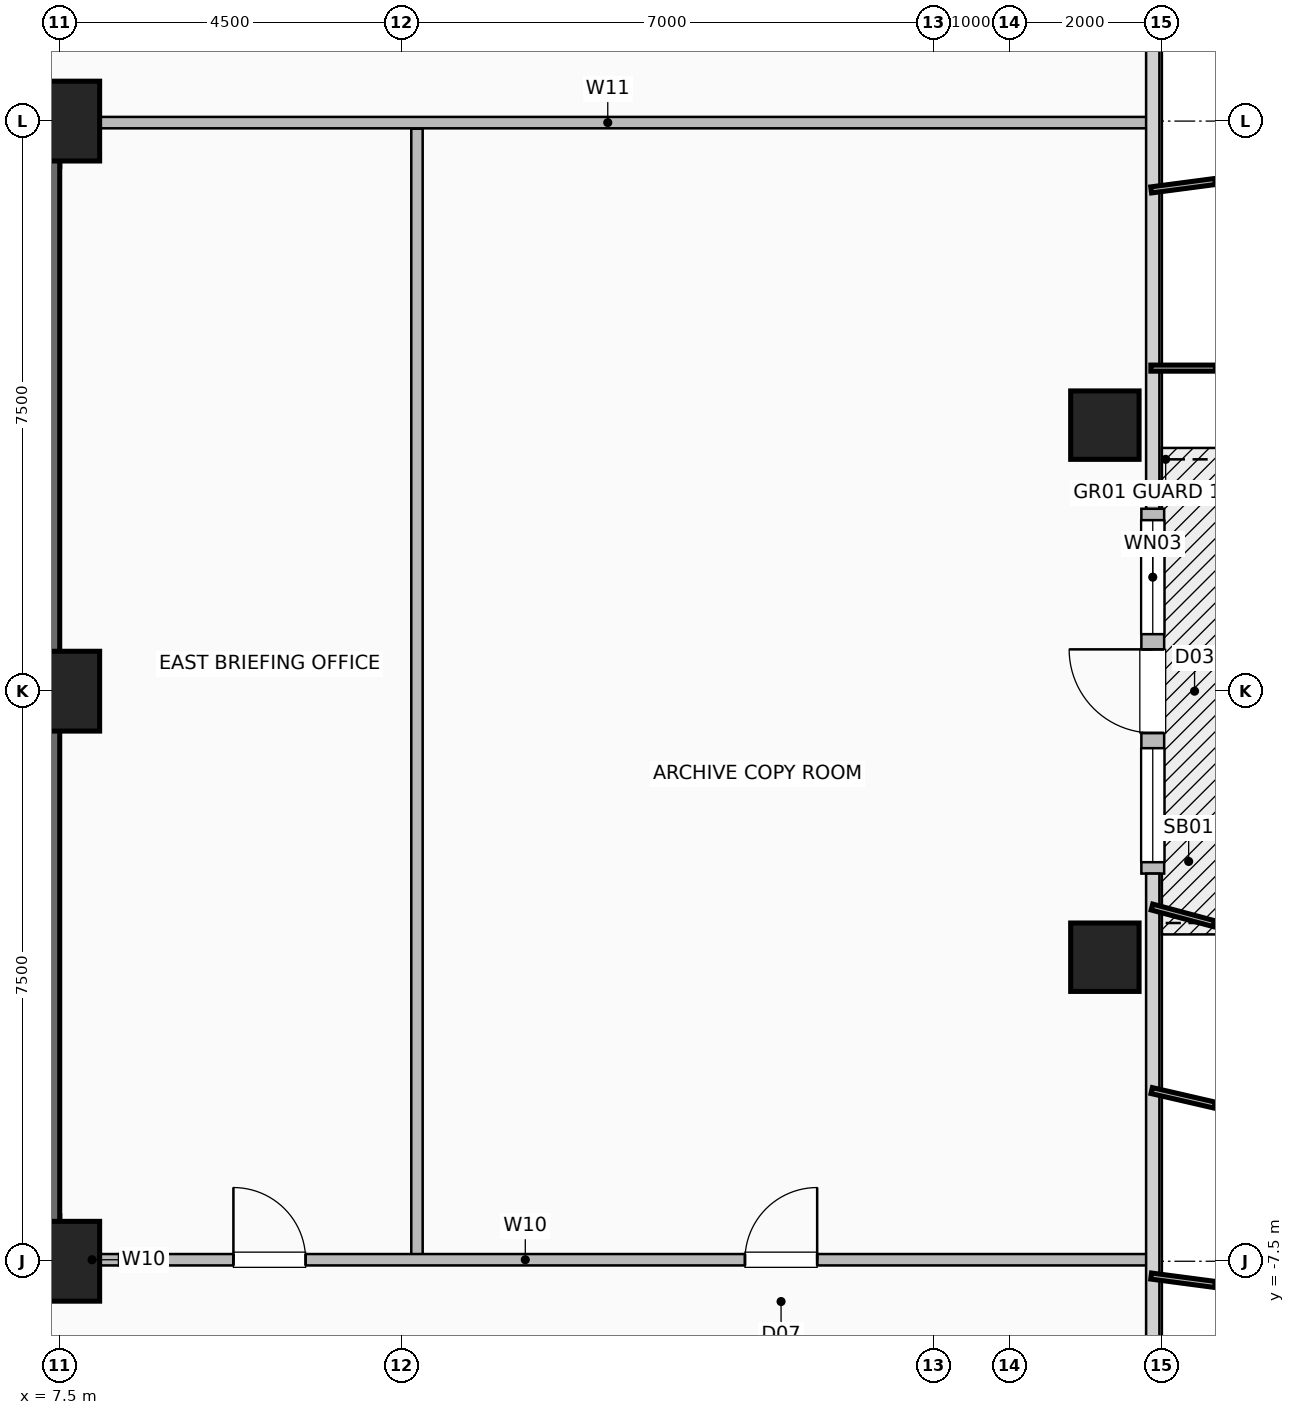
"""IFC4 building model, lengths in metres.
Left out: names, types, materials, properties, quantities, classifications, styles, units other than length and angle.
Written with IfcOpenShell. Run it as: python <this file> out.ifc"""

import sys

from ifc_helpers import new_model, si_unit, direction, frame, frame_2d, origin, origin_2d, place, context, subcontext, project, spatial, rectangle, hollow_rectangle, extrude, element, fill, save


model = new_model("IFC4")
c1 = context("Model", 3, precision=1e-05, world=origin(), true_north=direction((0.0, 1.0)))
c2 = subcontext(c1, "Body", "Model", "MODEL_VIEW")
j1 = project(units=[si_unit("LENGTHUNIT", "METRE"), si_unit("PLANEANGLEUNIT", "RADIAN")], contexts=[c1])
p1 = place(None, origin())
s1 = spatial("IfcSite", under=j1, at=p1, CompositionType="ELEMENT")
p2 = place(p1, origin())
s2 = spatial("IfcBuilding", under=s1, at=p2, CompositionType="ELEMENT")
p3 = place(p2, frame((0.0, 0.0, 104.8)))
s3 = spatial("IfcBuildingStorey", under=s2, at=p3, CompositionType="ELEMENT", Elevation=104.8)
for number, where, z_axis, x_axis in (
    (1, (7.5, -7.5, 0.0), (0.0, 0.0, 1.0), (1.0, 0.0, 0.0)),
    (2, (7.5, 0.0, 0.0), (0.0, 0.0, 1.0), (1.0, 0.0, 0.0)),
    (3, (7.5, 7.5, 0.0), (0.0, 0.0, 1.0), (1.0, 0.0, 0.0)),
):
    element("IfcColumn", number, at=place(p3, frame(where, z_axis=z_axis, x_axis=x_axis)), inside=s3, PredefinedType="COLUMN", context=c2, shape_type="SweptSolid", body=[
        extrude(hollow_rectangle(XDim=1.05, YDim=1.05, WallThickness=0.05, at=origin_2d()), origin(), (0.0, 0.0, 1.0), 3.6),
    ])
for number, where, z_axis, x_axis in (
    (4, (21.25, -3.5, 0.0), (0.0, 0.0, 1.0), (1.0, 0.0, 0.0)),
    (5, (21.25, 3.5, 0.0), (0.0, 0.0, 1.0), (1.0, 0.0, 0.0)),
):
    element("IfcColumn", number, at=place(p3, frame(where, z_axis=z_axis, x_axis=x_axis)), inside=s3, PredefinedType="COLUMN", context=c2, shape_type="SweptSolid", body=[
        extrude(hollow_rectangle(XDim=0.9, YDim=0.9, WallThickness=0.045, at=origin_2d()), origin(), (0.0, 0.0, 1.0), 3.6),
    ])
p4 = place(p3, frame((21.88, -2.4, 0.0), z_axis=(0.0, 0.0, 1.0), x_axis=(0.0, 1.0, 0.0)))
e6 = element("IfcWall", 6, at=p4, inside=s3, PredefinedType="SOLIDWALL", context=c2, shape_type="SweptSolid", body=[
    extrude(rectangle(XDim=4.8, YDim=0.3, at=frame_2d((2.4, 0.0))), origin(), (0.0, 0.0, 1.0), 3.36),
])
p5 = place(p4, frame((1.85, 0.0, 0.0)))
e7 = element("IfcOpeningElement", 7, at=p5, cuts=e6, PredefinedType="OPENING", context=c2, shape_type="SweptSolid", body=[
    extrude(rectangle(XDim=1.1, YDim=2.2, at=frame_2d((0.55, 1.1))), frame((0.0, 0.16, 0.0), z_axis=(0.0, -1.0, 0.0), x_axis=(1.0, 0.0, 0.0)), (0.0, 0.0, 1.0), 0.32),
])
p6 = place(p4, frame((0.15, 0.0, 0.85)))
e8 = element("IfcOpeningElement", 8, at=p6, cuts=e6, PredefinedType="OPENING", context=c2, shape_type="SweptSolid", body=[
    extrude(rectangle(XDim=1.5, YDim=1.8, at=frame_2d((0.75, 0.9))), frame((0.0, 0.16, 0.0), z_axis=(0.0, -1.0, 0.0), x_axis=(1.0, 0.0, 0.0)), (0.0, 0.0, 1.0), 0.32),
])
p7 = place(p4, frame((3.15, 0.0, 0.85)))
e9 = element("IfcOpeningElement", 9, at=p7, cuts=e6, PredefinedType="OPENING", context=c2, shape_type="SweptSolid", body=[
    extrude(rectangle(XDim=1.5, YDim=1.8, at=frame_2d((0.75, 0.9))), frame((0.0, 0.16, 0.0), z_axis=(0.0, -1.0, 0.0), x_axis=(1.0, 0.0, 0.0)), (0.0, 0.0, 1.0), 0.32),
])
p8 = place(p3, frame((-7.5, -7.2, 0.0), z_axis=(0.0, 0.0, 1.0), x_axis=(1.0, 0.0, 0.0)))
e10 = element("IfcWall", 10, at=p8, inside=s3, PredefinedType="SHEAR", context=c2, shape_type="SweptSolid", body=[
    extrude(rectangle(XDim=15.0, YDim=0.6, at=frame_2d((7.5, 0.0))), origin(), (0.0, 0.0, 1.0), 3.36),
])
p9 = place(p8, frame((1.55, 0.0, 0.0)))
e11 = element("IfcOpeningElement", 11, at=p9, cuts=e10, PredefinedType="OPENING", context=c2, shape_type="SweptSolid", body=[
    extrude(rectangle(XDim=1.05, YDim=2.08, at=frame_2d((0.525, 1.04))), frame((0.0, 0.31, 0.0), z_axis=(0.0, -1.0, 0.0), x_axis=(1.0, 0.0, 0.0)), (0.0, 0.0, 1.0), 0.62),
])
p10 = place(p8, frame((12.4, 0.0, 0.0)))
e12 = element("IfcOpeningElement", 12, at=p10, cuts=e10, PredefinedType="OPENING", context=c2, shape_type="SweptSolid", body=[
    extrude(rectangle(XDim=1.05, YDim=2.08, at=frame_2d((0.525, 1.04))), frame((0.0, 0.31, 0.0), z_axis=(0.0, -1.0, 0.0), x_axis=(1.0, 0.0, 0.0)), (0.0, 0.0, 1.0), 0.62),
])
p11 = place(p8, frame((5.2, 0.0, 0.0)))
e13 = element("IfcOpeningElement", 13, at=p11, cuts=e10, PredefinedType="OPENING", context=c2, shape_type="SweptSolid", body=[
    extrude(rectangle(XDim=1.0, YDim=2.08, at=frame_2d((0.5, 1.04))), frame((0.0, 0.31, 0.0), z_axis=(0.0, -1.0, 0.0), x_axis=(1.0, 0.0, 0.0)), (0.0, 0.0, 1.0), 0.62),
])
p12 = place(p8, frame((8.65, 0.0, 0.0)))
e14 = element("IfcOpeningElement", 14, at=p12, cuts=e10, PredefinedType="OPENING", context=c2, shape_type="SweptSolid", body=[
    extrude(rectangle(XDim=1.0, YDim=2.08, at=frame_2d((0.5, 1.04))), frame((0.0, 0.31, 0.0), z_axis=(0.0, -1.0, 0.0), x_axis=(1.0, 0.0, 0.0)), (0.0, 0.0, 1.0), 0.62),
])
for number, where, z_axis, x_axis in (
    (15, (-7.5, 7.2, 0.0), (0.0, 0.0, 1.0), (1.0, 0.0, 0.0)),
    (16, (7.2, -7.5, 0.0), (0.0, 0.0, 1.0), (0.0, 1.0, 0.0)),
):
    element("IfcWall", number, at=place(p3, frame(where, z_axis=z_axis, x_axis=x_axis)), inside=s3, PredefinedType="SHEAR", context=c2, shape_type="SweptSolid", body=[
        extrude(rectangle(XDim=15.0, YDim=0.6, at=frame_2d((7.5, 0.0))), origin(), (0.0, 0.0, 1.0), 3.36),
    ])
p13 = place(p3, frame((7.45, -7.48, 0.0), z_axis=(0.0, 0.0, 1.0), x_axis=(1.0, 0.0, 0.0)))
e17 = element("IfcWall", 17, at=p13, inside=s3, PredefinedType="PARTITIONING", context=c2, shape_type="SweptSolid", body=[
    extrude(rectangle(XDim=0.95, YDim=0.15, at=frame_2d((0.475, 0.0))), origin(), (0.0, 0.0, 1.0), 3.36),
])
p14 = place(p3, frame((12.2, -7.48, 0.0), z_axis=(0.0, 0.0, 1.0), x_axis=(0.0, 1.0, 0.0)))
e18 = element("IfcWall", 18, at=p14, inside=s3, PredefinedType="PARTITIONING", context=c2, shape_type="SweptSolid", body=[
    extrude(rectangle(XDim=14.88, YDim=0.15, at=frame_2d((7.44, 0.0))), origin(), (0.0, 0.0, 1.0), 3.36),
])
p15 = place(p3, frame((8.28, -7.48, 0.0), z_axis=(0.0, 0.0, 1.0), x_axis=(1.0, 0.0, 0.0)))
e19 = element("IfcWall", 19, at=p15, inside=s3, PredefinedType="PARTITIONING", context=c2, shape_type="SweptSolid", body=[
    extrude(rectangle(XDim=13.54, YDim=0.15, at=frame_2d((6.77, 0.0))), origin(), (0.0, 0.0, 1.0), 3.36),
])
p16 = place(p15, frame((1.505, 0.0, 0.0)))
e20 = element("IfcOpeningElement", 20, at=p16, cuts=e19, PredefinedType="OPENING", context=c2, shape_type="SweptSolid", body=[
    extrude(rectangle(XDim=0.95, YDim=2.06, at=frame_2d((0.475, 1.03))), frame((0.0, 0.085, 0.0), z_axis=(0.0, -1.0, 0.0), x_axis=(1.0, 0.0, 0.0)), (0.0, 0.0, 1.0), 0.17),
])
p17 = place(p15, frame((8.235, 0.0, 0.0)))
e21 = element("IfcOpeningElement", 21, at=p17, cuts=e19, PredefinedType="OPENING", context=c2, shape_type="SweptSolid", body=[
    extrude(rectangle(XDim=0.95, YDim=2.06, at=frame_2d((0.475, 1.03))), frame((0.0, 0.085, 0.0), z_axis=(0.0, -1.0, 0.0), x_axis=(1.0, 0.0, 0.0)), (0.0, 0.0, 1.0), 0.17),
])
p18 = place(p3, frame((7.6, 7.48, 0.0), z_axis=(0.0, 0.0, 1.0), x_axis=(1.0, 0.0, 0.0)))
e22 = element("IfcWall", 22, at=p18, inside=s3, PredefinedType="PARTITIONING", context=c2, shape_type="SweptSolid", body=[
    extrude(rectangle(XDim=14.22, YDim=0.15, at=frame_2d((7.11, 0.0))), origin(), (0.0, 0.0, 1.0), 3.36),
])
p19 = place(p5, origin())
e23 = element("IfcDoor", 23, at=p19, inside=s3, OperationType="SINGLE_SWING_RIGHT", PredefinedType="DOOR", context=c2, shape_type="SweptSolid", body=[
    extrude(rectangle(XDim=1.1, YDim=2.2, at=frame_2d((0.55, 1.1))), frame((0.0, 0.025, 0.0), z_axis=(0.0, -1.0, 0.0), x_axis=(1.0, 0.0, 0.0)), (0.0, 0.0, 1.0), 0.05),
])
fill(e7, e23)
p20 = place(p6, origin())
e24 = element("IfcWindow", 24, at=p20, inside=s3, PartitioningType="SINGLE_PANEL", PredefinedType="WINDOW", context=c2, shape_type="SweptSolid", body=[
    extrude(rectangle(XDim=1.5, YDim=1.8, at=frame_2d((0.75, 0.9))), frame((0.0, 0.03, 0.0), z_axis=(0.0, -1.0, 0.0), x_axis=(1.0, 0.0, 0.0)), (0.0, 0.0, 1.0), 0.06),
])
fill(e8, e24)
p21 = place(p7, origin())
e25 = element("IfcWindow", 25, at=p21, inside=s3, PartitioningType="SINGLE_PANEL", PredefinedType="WINDOW", context=c2, shape_type="SweptSolid", body=[
    extrude(rectangle(XDim=1.5, YDim=1.8, at=frame_2d((0.75, 0.9))), frame((0.0, 0.03, 0.0), z_axis=(0.0, -1.0, 0.0), x_axis=(1.0, 0.0, 0.0)), (0.0, 0.0, 1.0), 0.06),
])
fill(e9, e25)
p22 = place(p16, origin())
e26 = element("IfcDoor", 26, at=p22, inside=s3, OperationType="SINGLE_SWING_LEFT", PredefinedType="DOOR", context=c2, shape_type="SweptSolid", body=[
    extrude(rectangle(XDim=0.95, YDim=2.06, at=frame_2d((0.475, 1.03))), frame((0.0, 0.025, 0.0), z_axis=(0.0, -1.0, 0.0), x_axis=(1.0, 0.0, 0.0)), (0.0, 0.0, 1.0), 0.05),
])
fill(e20, e26)
p23 = place(p17, origin())
e27 = element("IfcDoor", 27, at=p23, inside=s3, OperationType="SINGLE_SWING_RIGHT", PredefinedType="DOOR", context=c2, shape_type="SweptSolid", body=[
    extrude(rectangle(XDim=0.95, YDim=2.06, at=frame_2d((0.475, 1.03))), frame((0.0, 0.025, 0.0), z_axis=(0.0, -1.0, 0.0), x_axis=(1.0, 0.0, 0.0)), (0.0, 0.0, 1.0), 0.05),
])
fill(e21, e27)
save(model, sys.argv[1])
